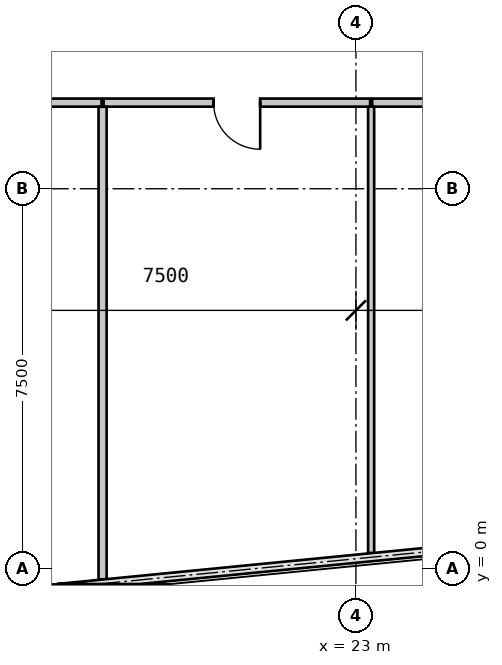
"""IFC4 building model, lengths in metres.
Left out: names, types, materials, properties, quantities, classifications, styles, units other than length and angle.
Written with IfcOpenShell. Run it as: python <this file> out.ifc"""

import sys

from ifc_helpers import new_model, si_unit, direction, frame, frame_2d, origin, place, context, subcontext, project, spatial, rectangle, extrude, source, transform, mapped, element, fill, save


model = new_model("IFC4")
c1 = context("Model", 3, precision=1e-05, world=origin(), true_north=direction((0.0, 1.0)))
c2 = subcontext(c1, "Body", "Model", "MODEL_VIEW")
j1 = project(units=[si_unit("LENGTHUNIT", "METRE"), si_unit("PLANEANGLEUNIT", "RADIAN")], contexts=[c1])
p1 = place(None, origin())
s1 = spatial("IfcSite", under=j1, at=p1, CompositionType="ELEMENT")
p2 = place(p1, origin())
s2 = spatial("IfcBuilding", under=s1, at=p2, CompositionType="ELEMENT")
p3 = place(p2, frame((0.0, 0.0, 99.75)))
s3 = spatial("IfcBuildingStorey", under=s2, at=p3, CompositionType="ELEMENT", Elevation=99.75)
m1 = source(origin(), c2, "Body", "SweptSolid", [
    extrude(rectangle(XDim=1.1, YDim=0.16, at=frame_2d((0.55, 0.0))), origin(), (0.0, 0.0, 1.0), 2.93),
])
p4 = place(p3, frame((17.98, 9.2, 0.0), z_axis=(0.0, 0.0, 1.0), x_axis=(-1.0, 0.0, 0.0)))
e1 = element("IfcWall", 1, at=p4, inside=s3, PredefinedType="PARTITIONING", context=c2, shape_type="MappedRepresentation", body=[
    mapped(m1, transform((0.0, 0.0, 0.0), scale=1.0)),
])
m2 = source(origin(), c2, "Body", "SweptSolid", [
    extrude(rectangle(XDim=5.26, YDim=0.16, at=frame_2d((2.63, 0.0))), origin(), (0.0, 0.0, 1.0), 2.93),
])
p5 = place(p3, frame((23.28, 9.2, 0.0), z_axis=(0.0, 0.0, 1.0), x_axis=(-1.0, 0.0, 0.0)))
e2 = element("IfcWall", 2, at=p5, inside=s3, PredefinedType="PARTITIONING", context=c2, shape_type="MappedRepresentation", body=[
    mapped(m2, transform((0.0, 0.0, 0.0), scale=1.0)),
])
m3 = source(origin(), c2, "Body", "SweptSolid", [
    extrude(rectangle(XDim=0.92, YDim=2.1, at=frame_2d((0.46, 1.05))), frame((0.0, 0.09, 0.0), z_axis=(0.0, -1.0, 0.0), x_axis=(1.0, 0.0, 0.0)), (0.0, 0.0, 1.0), 0.18),
])
p6 = place(p5, frame((2.17, 0.0, 0.0)))
e3 = element("IfcOpeningElement", 3, at=p6, cuts=e2, PredefinedType="OPENING", context=c2, shape_type="MappedRepresentation", body=[
    mapped(m3, transform((0.0, 0.0, 0.0), scale=1.0)),
])
m4 = source(origin(), c2, "Body", "SweptSolid", [
    extrude(rectangle(XDim=4.659, YDim=0.16, at=frame_2d((2.33, 0.0))), origin(), (0.0, 0.0, 1.0), 2.93),
])
p7 = place(p3, frame((27.98, 9.2, 0.0), z_axis=(0.0, 0.0, 1.0), x_axis=(-1.0, 0.0, 0.0)))
e4 = element("IfcWall", 4, at=p7, inside=s3, PredefinedType="PARTITIONING", context=c2, shape_type="MappedRepresentation", body=[
    mapped(m4, transform((0.0, 0.0, 0.0), scale=1.0)),
])
p8 = place(p7, frame((1.87, 0.0, 0.0)))
e5 = element("IfcOpeningElement", 5, at=p8, cuts=e4, PredefinedType="OPENING", context=c2, shape_type="MappedRepresentation", body=[
    mapped(m3, transform((0.0, 0.0, 0.0), scale=1.0)),
])
m5 = source(origin(), c2, "Body", "SweptSolid", [
    extrude(rectangle(XDim=9.325, YDim=0.16, at=frame_2d((4.663, 0.0))), origin(), (0.0, 0.0, 1.0), 2.93),
])
p9 = place(p3, frame((18.0, 9.118, 0.0), z_axis=(0.0, 0.0, 1.0), x_axis=(0.0, -1.0, 0.0)))
e6 = element("IfcWall", 6, at=p9, inside=s3, PredefinedType="PARTITIONING", context=c2, shape_type="MappedRepresentation", body=[
    mapped(m5, transform((0.0, 0.0, 0.0), scale=1.0)),
])
m6 = source(origin(), c2, "Body", "SweptSolid", [
    extrude(rectangle(XDim=8.81, YDim=0.12, at=frame_2d((4.405, 0.0))), origin(), (0.0, 0.0, 1.0), 2.93),
])
p10 = place(p3, frame((23.3, 9.12, 0.0), z_axis=(0.0, 0.0, 1.0), x_axis=(0.0, -1.0, 0.0)))
e7 = element("IfcWall", 7, at=p10, inside=s3, PredefinedType="PARTITIONING", context=c2, shape_type="MappedRepresentation", body=[
    mapped(m6, transform((0.0, 0.0, 0.0), scale=1.0)),
])
m7 = source(origin(), c2, "Body", "SweptSolid", [
    extrude(rectangle(XDim=0.92, YDim=2.1, at=frame_2d((0.46, 1.05))), frame((0.0, 0.025, 0.0), z_axis=(0.0, -1.0, 0.0), x_axis=(1.0, 0.0, 0.0)), (0.0, 0.0, 1.0), 0.05),
])
p11 = place(p6, origin())
e8 = element("IfcDoor", 8, at=p11, inside=s3, OperationType="SINGLE_SWING_LEFT", PredefinedType="DOOR", context=c2, shape_type="MappedRepresentation", body=[
    mapped(m7, transform((0.0, 0.0, 0.0), scale=1.0)),
])
fill(e3, e8)
save(model, sys.argv[1])
